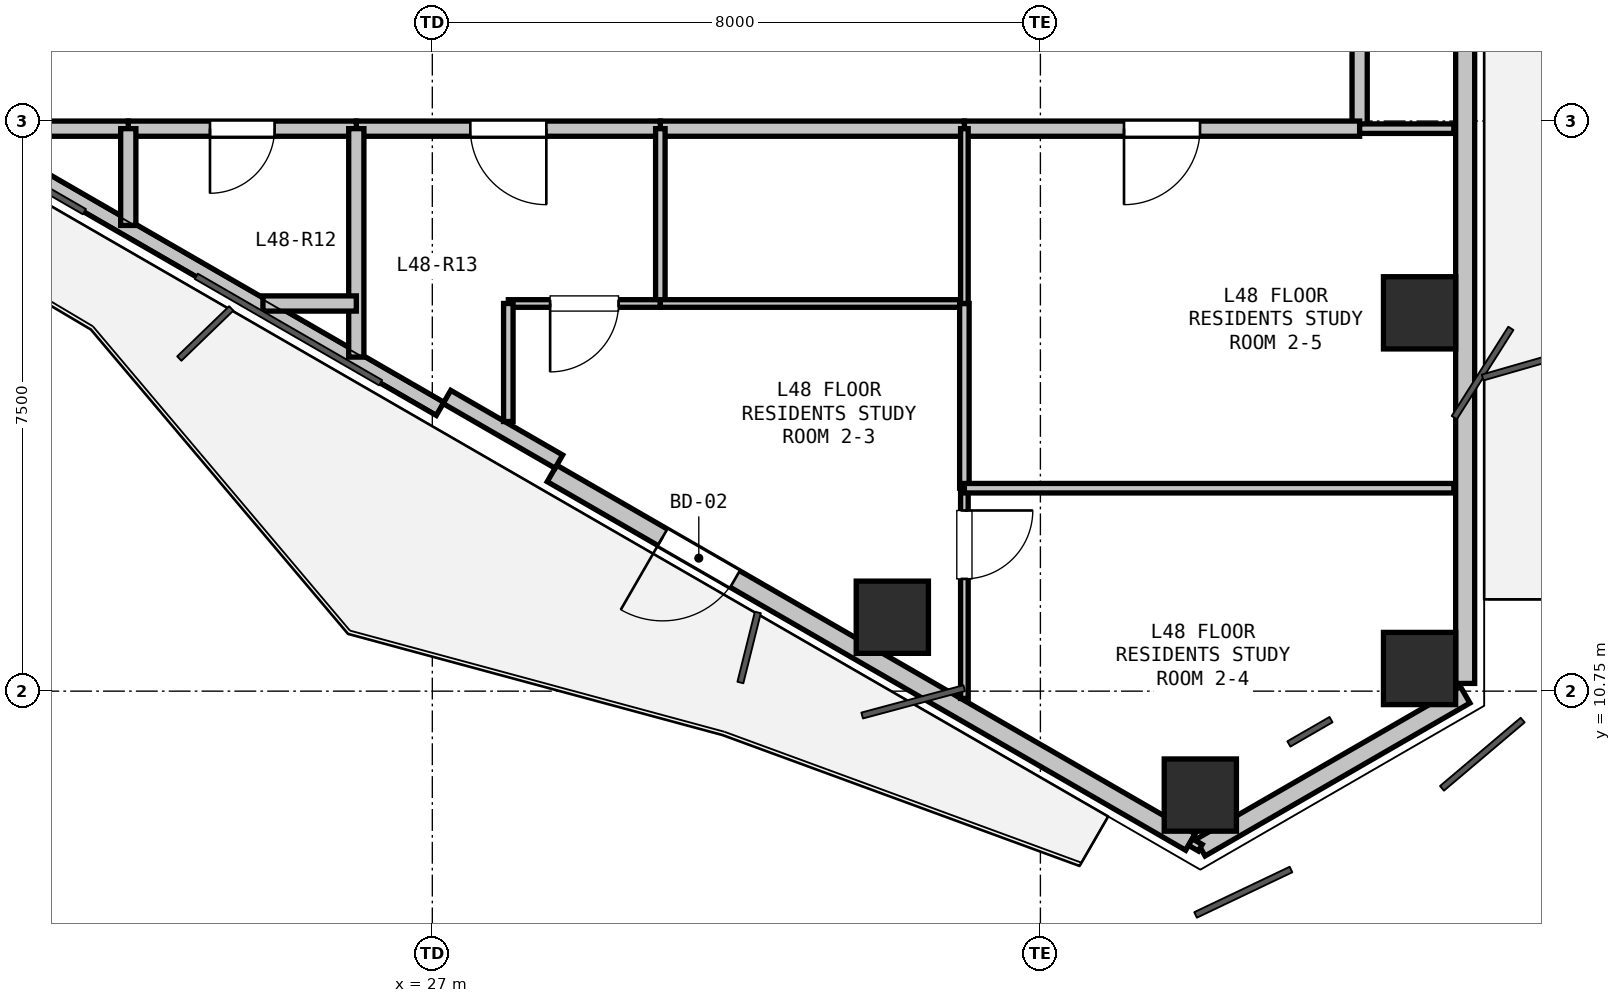
"""IFC4 building model, lengths in metres.
Left out: names, types, materials, properties, quantities, classifications, styles, units other than length and angle.
Written with IfcOpenShell. Run it as: python <this file> out.ifc"""

import sys

from ifc_helpers import new_model, si_unit, direction, frame, frame_2d, origin, origin_2d, place, context, subcontext, project, spatial, rectangle, hollow_rectangle, extrude, element, fill, save


model = new_model("IFC4")
c1 = context("Model", 3, precision=1e-05, world=origin(), true_north=direction((0.0, 1.0)))
c2 = subcontext(c1, "Body", "Model", "MODEL_VIEW")
j1 = project(units=[si_unit("LENGTHUNIT", "METRE"), si_unit("PLANEANGLEUNIT", "RADIAN")], contexts=[c1])
p1 = place(None, origin())
s1 = spatial("IfcSite", under=j1, at=p1, CompositionType="ELEMENT")
p2 = place(p1, origin())
s2 = spatial("IfcBuilding", under=s1, at=p2, CompositionType="ELEMENT")
p3 = place(p2, frame((0.0, 0.0, 175.5)))
s3 = spatial("IfcBuildingStorey", under=s2, at=p3, CompositionType="ELEMENT", Elevation=175.5)
for number, where, z_axis, x_axis in (
    (1, (39.988, 15.727, -0.23), (0.0, 0.0, 1.0), (1.0, 0.0, 0.0)),
    (2, (39.988, 11.048, -0.23), (0.0, 0.0, 1.0), (1.0, 0.0, 0.0)),
    (3, (37.104, 9.383, -0.23), (0.0, 0.0, 1.0), (1.0, 0.0, 0.0)),
    (4, (33.052, 11.722, -0.23), (0.0, 0.0, 1.0), (1.0, 0.0, 0.0)),
):
    element("IfcColumn", number, at=place(p3, frame(where, z_axis=z_axis, x_axis=x_axis)), inside=s3, PredefinedType="COLUMN", context=c2, shape_type="SweptSolid", body=[
        extrude(hollow_rectangle(XDim=0.95, YDim=0.95, WallThickness=0.028, at=origin_2d()), origin(), (0.0, 0.0, 1.0), 3.53),
    ])
p4 = place(p3, frame((40.588, 10.702, 0.0), z_axis=(0.0, 0.0, 1.0), x_axis=(-0.866023907196, -0.500002592159, 0.0)))
e5 = element("IfcWall", 5, at=p4, inside=s3, PredefinedType="SOLIDWALL", context=c2, shape_type="SweptSolid", body=[
    extrude(rectangle(XDim=4.023, YDim=0.25, at=frame_2d((2.012, 0.0))), origin(), (0.0, 0.0, 1.0), 2.69),
])
p5 = place(p3, frame((40.588, 20.551, 0.0), z_axis=(0.0, 0.0, 1.0), x_axis=(0.0, -1.0, 0.0)))
e6 = element("IfcWall", 6, at=p5, inside=s3, PredefinedType="SOLIDWALL", context=c2, shape_type="SweptSolid", body=[
    extrude(rectangle(XDim=9.699, YDim=0.25, at=frame_2d((4.85, 0.0))), origin(), (0.0, 0.0, 1.0), 2.69),
])
p6 = place(p3, frame((36.974, 8.765, 0.0), z_axis=(0.0, 0.0, 1.0), x_axis=(-0.866016233231, 0.500015883528, 0.0)))
e7 = element("IfcWall", 7, at=p6, inside=s3, PredefinedType="SOLIDWALL", context=c2, shape_type="SweptSolid", body=[
    extrude(rectangle(XDim=9.699, YDim=0.25, at=frame_2d((4.85, 0.0))), origin(), (0.0, 0.0, 1.0), 2.69),
])
p7 = place(p6, frame((6.919, 0.0, 0.0)))
e8 = element("IfcOpeningElement", 8, at=p7, cuts=e7, PredefinedType="OPENING", context=c2, shape_type="SweptSolid", body=[
    extrude(rectangle(XDim=1.1, YDim=2.1, at=frame_2d((0.55, 1.05))), frame((0.0, 0.135, 0.0), z_axis=(0.0, -1.0, 0.0), x_axis=(1.0, 0.0, 0.0)), (0.0, 0.0, 1.0), 0.27),
])
p8 = place(p3, frame((27.102, 14.464, 0.0), z_axis=(0.0, 0.0, 1.0), x_axis=(-0.866020680503, 0.500008180874, 0.0)))
e9 = element("IfcWall", 9, at=p8, inside=s3, PredefinedType="PARAPET", context=c2, shape_type="SweptSolid", body=[
    extrude(rectangle(XDim=8.999, YDim=0.2, at=frame_2d((4.5, 0.0))), origin(), (0.0, 0.0, 1.0), 0.2),
])
p9 = place(p3, frame((28.665, 13.77, 0.0), z_axis=(0.0, 0.0, 1.0), x_axis=(-0.866025371046, 0.500000056704, 0.0)))
e10 = element("IfcWall", 10, at=p9, inside=s3, PredefinedType="PARAPET", context=c2, shape_type="SweptSolid", body=[
    extrude(rectangle(XDim=1.7, YDim=0.2, at=frame_2d((0.85, 0.0))), origin(), (0.0, 0.0, 1.0), 2.69),
])
p10 = place(p3, frame((39.2, 19.9, 0.0), z_axis=(0.0, 0.0, 1.0), x_axis=(0.0, -1.0, 0.0)))
e11 = element("IfcWall", 11, at=p10, inside=s3, PredefinedType="PARTITIONING", context=c2, shape_type="SweptSolid", body=[
    extrude(rectangle(XDim=1.75, YDim=0.2, at=frame_2d((0.875, 0.0))), origin(), (0.0, 0.0, 1.0), 3.07),
])
p11 = place(p3, frame((39.2, 18.15, 0.0), z_axis=(0.0, 0.0, 1.0), x_axis=(-1.0, 0.0, 0.0)))
e12 = element("IfcWall", 12, at=p11, inside=s3, PredefinedType="PARTITIONING", context=c2, shape_type="SweptSolid", body=[
    extrude(rectangle(XDim=5.2, YDim=0.2, at=frame_2d((2.6, 0.0))), origin(), (0.0, 0.0, 1.0), 2.518),
])
p12 = place(p11, frame((2.1, 0.0, 0.0)))
e13 = element("IfcOpeningElement", 13, at=p12, cuts=e12, PredefinedType="OPENING", context=c2, shape_type="SweptSolid", body=[
    extrude(rectangle(XDim=1.0, YDim=2.15, at=frame_2d((0.5, 1.075))), frame((0.0, 0.11, 0.0), z_axis=(0.0, -1.0, 0.0), x_axis=(1.0, 0.0, 0.0)), (0.0, 0.0, 1.0), 0.22),
])
p13 = place(p3, frame((34.0, 18.15, 0.0), z_axis=(0.0, 0.0, 1.0), x_axis=(-1.0, 0.0, 0.0)))
e14 = element("IfcWall", 14, at=p13, inside=s3, PredefinedType="PARTITIONING", context=c2, shape_type="SweptSolid", body=[
    extrude(rectangle(XDim=4.0, YDim=0.2, at=frame_2d((2.0, 0.0))), origin(), (0.0, 0.0, 1.0), 3.07),
])
p14 = place(p3, frame((30.0, 18.15, 0.0), z_axis=(0.0, 0.0, 1.0), x_axis=(-1.0, 0.0, 0.0)))
e15 = element("IfcWall", 15, at=p14, inside=s3, PredefinedType="PARTITIONING", context=c2, shape_type="SweptSolid", body=[
    extrude(rectangle(XDim=4.0, YDim=0.2, at=frame_2d((2.0, 0.0))), origin(), (0.0, 0.0, 1.0), 3.07),
])
p15 = place(p14, frame((1.5, 0.0, 0.0)))
e16 = element("IfcOpeningElement", 16, at=p15, cuts=e15, PredefinedType="OPENING", context=c2, shape_type="SweptSolid", body=[
    extrude(rectangle(XDim=1.0, YDim=2.15, at=frame_2d((0.5, 1.075))), frame((0.0, 0.11, 0.0), z_axis=(0.0, -1.0, 0.0), x_axis=(1.0, 0.0, 0.0)), (0.0, 0.0, 1.0), 0.22),
])
p16 = place(p3, frame((26.0, 18.15, 0.0), z_axis=(0.0, 0.0, 1.0), x_axis=(-1.0, 0.0, 0.0)))
e17 = element("IfcWall", 17, at=p16, inside=s3, PredefinedType="PARTITIONING", context=c2, shape_type="SweptSolid", body=[
    extrude(rectangle(XDim=3.0, YDim=0.2, at=frame_2d((1.5, 0.0))), origin(), (0.0, 0.0, 1.0), 2.518),
])
p17 = place(p16, frame((1.075, 0.0, 0.0)))
e18 = element("IfcOpeningElement", 18, at=p17, cuts=e17, PredefinedType="OPENING", context=c2, shape_type="SweptSolid", body=[
    extrude(rectangle(XDim=0.85, YDim=2.1, at=frame_2d((0.425, 1.05))), frame((0.0, 0.11, 0.0), z_axis=(0.0, -1.0, 0.0), x_axis=(1.0, 0.0, 0.0)), (0.0, 0.0, 1.0), 0.22),
])
p18 = place(p3, frame((23.0, 18.15, 0.0), z_axis=(0.0, 0.0, 1.0), x_axis=(-1.0, 0.0, 0.0)))
e19 = element("IfcWall", 19, at=p18, inside=s3, PredefinedType="PARTITIONING", context=c2, shape_type="SweptSolid", body=[
    extrude(rectangle(XDim=2.212, YDim=0.2, at=frame_2d((1.106, 0.0))), origin(), (0.0, 0.0, 1.0), 2.365),
])
p19 = place(p3, frame((26.0, 18.15, 0.0), z_axis=(0.0, 0.0, 1.0), x_axis=(0.0, -1.0, 0.0)))
e20 = element("IfcWall", 20, at=p19, inside=s3, PredefinedType="PARTITIONING", context=c2, shape_type="SweptSolid", body=[
    extrude(rectangle(XDim=3.005, YDim=0.2, at=frame_2d((1.502, 0.0))), origin(), (0.0, 0.0, 1.0), 2.365),
])
p20 = place(p3, frame((26.0, 15.85, 0.0), z_axis=(0.0, 0.0, 1.0), x_axis=(-1.0, 0.0, 0.0)))
e21 = element("IfcWall", 21, at=p20, inside=s3, PredefinedType="PARTITIONING", context=c2, shape_type="SweptSolid", body=[
    extrude(rectangle(XDim=1.229, YDim=0.2, at=frame_2d((0.614, 0.0))), origin(), (0.0, 0.0, 1.0), 2.365),
])
p21 = place(p3, frame((23.0, 16.877, 0.0), z_axis=(0.0, 0.0, 1.0), x_axis=(0.0, 1.0, 0.0)))
e22 = element("IfcWall", 22, at=p21, inside=s3, PredefinedType="PARTITIONING", context=c2, shape_type="SweptSolid", body=[
    extrude(rectangle(XDim=1.273, YDim=0.2, at=frame_2d((0.636, 0.0))), origin(), (0.0, 0.0, 1.0), 2.365),
])
p22 = place(p3, frame((30.0, 18.15, 0.0), z_axis=(0.0, 0.0, 1.0), x_axis=(0.0, -1.0, 0.0)))
e23 = element("IfcWall", 23, at=p22, inside=s3, PredefinedType="PARTITIONING", context=c2, shape_type="SweptSolid", body=[
    extrude(rectangle(XDim=2.3, YDim=0.125, at=frame_2d((1.15, 0.0))), origin(), (0.0, 0.0, 1.0), 3.07),
])
p23 = place(p3, frame((30.0, 15.85, 0.0), z_axis=(0.0, 0.0, 1.0), x_axis=(-1.0, 0.0, 0.0)))
e24 = element("IfcWall", 24, at=p23, inside=s3, PredefinedType="PARTITIONING", context=c2, shape_type="SweptSolid", body=[
    extrude(rectangle(XDim=2.0, YDim=0.1, at=frame_2d((1.0, 0.0))), origin(), (0.0, 0.0, 1.0), 3.07),
])
p24 = place(p23, frame((0.55, 0.0, 0.0)))
e25 = element("IfcOpeningElement", 25, at=p24, cuts=e24, PredefinedType="OPENING", context=c2, shape_type="SweptSolid", body=[
    extrude(rectangle(XDim=0.9, YDim=2.1, at=frame_2d((0.45, 1.05))), frame((0.0, 0.06, 0.0), z_axis=(0.0, -1.0, 0.0), x_axis=(1.0, 0.0, 0.0)), (0.0, 0.0, 1.0), 0.12),
])
p25 = place(p3, frame((28.0, 15.85, 0.0), z_axis=(0.0, 0.0, 1.0), x_axis=(0.0, -1.0, 0.0)))
e26 = element("IfcWall", 26, at=p25, inside=s3, PredefinedType="PARTITIONING", context=c2, shape_type="SweptSolid", body=[
    extrude(rectangle(XDim=1.553, YDim=0.125, at=frame_2d((0.776, 0.0))), origin(), (0.0, 0.0, 1.0), 2.365),
])
p26 = place(p3, frame((30.0, 15.85, 0.0), z_axis=(0.0, 0.0, 1.0), x_axis=(1.0, 0.0, 0.0)))
e27 = element("IfcWall", 27, at=p26, inside=s3, PredefinedType="PARTITIONING", context=c2, shape_type="SweptSolid", body=[
    extrude(rectangle(XDim=4.0, YDim=0.1, at=frame_2d((2.0, 0.0))), origin(), (0.0, 0.0, 1.0), 3.07),
])
p27 = place(p3, frame((34.0, 15.85, 0.0), z_axis=(0.0, 0.0, 1.0), x_axis=(0.0, -1.0, 0.0)))
e28 = element("IfcWall", 28, at=p27, inside=s3, PredefinedType="PARTITIONING", context=c2, shape_type="SweptSolid", body=[
    extrude(rectangle(XDim=2.43, YDim=0.125, at=frame_2d((1.215, 0.0))), origin(), (0.0, 0.0, 1.0), 3.07),
])
p28 = place(p3, frame((34.0, 13.42, 0.0), z_axis=(0.0, 0.0, 1.0), x_axis=(0.0, -1.0, 0.0)))
e29 = element("IfcWall", 29, at=p28, inside=s3, PredefinedType="PARTITIONING", context=c2, shape_type="SweptSolid", body=[
    extrude(rectangle(XDim=2.766, YDim=0.1, at=frame_2d((1.383, 0.0))), origin(), (0.0, 0.0, 1.0), 2.735),
])
p29 = place(p28, frame((0.293, 0.0, 0.0)))
e30 = element("IfcOpeningElement", 30, at=p29, cuts=e29, PredefinedType="OPENING", context=c2, shape_type="SweptSolid", body=[
    extrude(rectangle(XDim=0.9, YDim=2.1, at=frame_2d((0.45, 1.05))), frame((0.0, 0.06, 0.0), z_axis=(0.0, -1.0, 0.0), x_axis=(1.0, 0.0, 0.0)), (0.0, 0.0, 1.0), 0.12),
])
p30 = place(p3, frame((34.0, 13.42, 0.0), z_axis=(0.0, 0.0, 1.0), x_axis=(1.0, 0.0, 0.0)))
e31 = element("IfcWall", 31, at=p30, inside=s3, PredefinedType="PARTITIONING", context=c2, shape_type="SweptSolid", body=[
    extrude(rectangle(XDim=6.439, YDim=0.125, at=frame_2d((3.22, 0.0))), origin(), (0.0, 0.0, 1.0), 2.518),
])
p31 = place(p3, frame((37.104, 8.69, 0.0), z_axis=(0.0, 0.0, 1.0), x_axis=(-0.866131372301, 0.499816412211, 0.0)))
e32 = element("IfcWall", 32, at=p31, inside=s3, PredefinedType="PARTITIONING", context=c2, shape_type="SweptSolid", body=[
    extrude(rectangle(XDim=0.15, YDim=0.1, at=frame_2d((0.075, 0.0))), origin(), (0.0, 0.0, 1.0), 3.07),
])
p32 = place(p3, frame((39.2, 18.15, 0.0), z_axis=(0.0, 0.0, 1.0), x_axis=(1.0, 0.0, 0.0)))
e33 = element("IfcWall", 33, at=p32, inside=s3, PredefinedType="PARTITIONING", context=c2, shape_type="SweptSolid", body=[
    extrude(rectangle(XDim=1.24, YDim=0.125, at=frame_2d((0.62, 0.0))), origin(), (0.0, 0.0, 1.0), 2.365),
])
p33 = place(p3, frame((34.0, 15.85, 0.0), z_axis=(0.0, 0.0, 1.0), x_axis=(0.0, 1.0, 0.0)))
e34 = element("IfcWall", 34, at=p33, inside=s3, PredefinedType="PARTITIONING", context=c2, shape_type="SweptSolid", body=[
    extrude(rectangle(XDim=2.3, YDim=0.1, at=frame_2d((1.15, 0.0))), origin(), (0.0, 0.0, 1.0), 3.07),
])
p34 = place(p7, origin())
e35 = element("IfcDoor", 35, at=p34, inside=s3, OperationType="SINGLE_SWING_RIGHT", PredefinedType="DOOR", context=c2, shape_type="SweptSolid", body=[
    extrude(rectangle(XDim=1.1, YDim=2.1, at=frame_2d((0.55, 1.05))), frame((0.0, 0.025, 0.0), z_axis=(0.0, -1.0, 0.0), x_axis=(1.0, 0.0, 0.0)), (0.0, 0.0, 1.0), 0.05),
])
fill(e8, e35)
p35 = place(p17, origin())
e36 = element("IfcDoor", 36, at=p35, inside=s3, OperationType="SINGLE_SWING_RIGHT", PredefinedType="DOOR", context=c2, shape_type="SweptSolid", body=[
    extrude(rectangle(XDim=0.85, YDim=2.1, at=frame_2d((0.425, 1.05))), frame((0.0, 0.025, 0.0), z_axis=(0.0, -1.0, 0.0), x_axis=(1.0, 0.0, 0.0)), (0.0, 0.0, 1.0), 0.05),
])
fill(e18, e36)
p36 = place(p15, origin())
e37 = element("IfcDoor", 37, at=p36, inside=s3, OperationType="SINGLE_SWING_LEFT", PredefinedType="DOOR", context=c2, shape_type="SweptSolid", body=[
    extrude(rectangle(XDim=1.0, YDim=2.15, at=frame_2d((0.5, 1.075))), frame((0.0, 0.025, 0.0), z_axis=(0.0, -1.0, 0.0), x_axis=(1.0, 0.0, 0.0)), (0.0, 0.0, 1.0), 0.05),
])
fill(e16, e37)
p37 = place(p12, origin())
e38 = element("IfcDoor", 38, at=p37, inside=s3, OperationType="SINGLE_SWING_RIGHT", PredefinedType="DOOR", context=c2, shape_type="SweptSolid", body=[
    extrude(rectangle(XDim=1.0, YDim=2.15, at=frame_2d((0.5, 1.075))), frame((0.0, 0.025, 0.0), z_axis=(0.0, -1.0, 0.0), x_axis=(1.0, 0.0, 0.0)), (0.0, 0.0, 1.0), 0.05),
])
fill(e13, e38)
p38 = place(p24, origin())
e39 = element("IfcDoor", 39, at=p38, inside=s3, OperationType="SINGLE_SWING_RIGHT", PredefinedType="DOOR", context=c2, shape_type="SweptSolid", body=[
    extrude(rectangle(XDim=0.9, YDim=2.1, at=frame_2d((0.45, 1.05))), frame((0.0, 0.025, 0.0), z_axis=(0.0, -1.0, 0.0), x_axis=(1.0, 0.0, 0.0)), (0.0, 0.0, 1.0), 0.05),
])
fill(e25, e39)
p39 = place(p29, origin())
e40 = element("IfcDoor", 40, at=p39, inside=s3, OperationType="SINGLE_SWING_LEFT", PredefinedType="DOOR", context=c2, shape_type="SweptSolid", body=[
    extrude(rectangle(XDim=0.9, YDim=2.1, at=frame_2d((0.45, 1.05))), frame((0.0, 0.025, 0.0), z_axis=(0.0, -1.0, 0.0), x_axis=(1.0, 0.0, 0.0)), (0.0, 0.0, 1.0), 0.05),
])
fill(e30, e40)
save(model, sys.argv[1])
